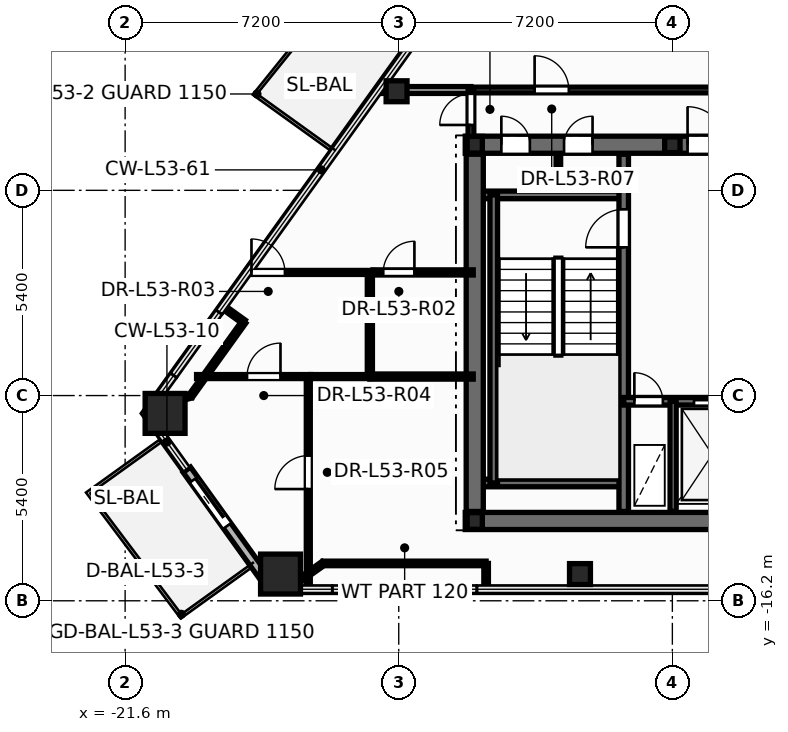
"""IFC4 building model, lengths in metres.
Left out: names, types, materials, properties, quantities, classifications, styles, units other than length and angle.
Written with IfcOpenShell. Run it as: python <this file> out.ifc"""

import sys

from ifc_helpers import new_model, si_unit, direction, frame, frame_2d, origin, origin_2d, place, context, subcontext, project, spatial, rectangle, hollow_rectangle, hollow_circle, i_section, extrude, element, fill, save


model = new_model("IFC4")
c1 = context("Model", 3, precision=1e-05, world=origin(), true_north=direction((0.0, 1.0)))
c2 = subcontext(c1, "Body", "Model", "MODEL_VIEW")
j1 = project(units=[si_unit("LENGTHUNIT", "METRE"), si_unit("PLANEANGLEUNIT", "RADIAN")], contexts=[c1])
p1 = place(None, origin())
s1 = spatial("IfcSite", under=j1, at=p1, CompositionType="ELEMENT")
p2 = place(p1, origin())
s2 = spatial("IfcBuilding", under=s1, at=p2, CompositionType="ELEMENT")
p3 = place(p2, frame((0.0, 0.0, 203.7)))
s3 = spatial("IfcBuildingStorey", under=s2, at=p3, CompositionType="ELEMENT", Elevation=203.7)
for number, where, z_axis, x_axis in (
    (1, (-20.548, -11.27, 0.0), (0.0, 0.0, 1.0), (1.0, 0.0, 0.0)),
    (2, (-17.511, -15.497, 0.0), (0.0, 0.0, 1.0), (1.0, 0.0, 0.0)),
):
    element("IfcColumn", number, at=place(p3, frame(where, z_axis=z_axis, x_axis=x_axis)), inside=s3, PredefinedType="COLUMN", context=c2, shape_type="SweptSolid", body=[
        extrude(hollow_rectangle(XDim=1.05, YDim=1.05, WallThickness=0.045, at=origin_2d()), origin(), (0.0, 0.0, 1.0), 3.6),
    ])
for number, where, z_axis, x_axis in (
    (3, (-9.631, -15.497, 0.0), (0.0, 0.0, 1.0), (1.0, 0.0, 0.0)),
    (4, (-14.457, -2.793, 0.0), (0.0, 0.0, 1.0), (1.0, 0.0, 0.0)),
):
    element("IfcColumn", number, at=place(p3, frame(where, z_axis=z_axis, x_axis=x_axis)), inside=s3, PredefinedType="COLUMN", context=c2, shape_type="SweptSolid", body=[
        extrude(hollow_circle(Radius=0.275, WallThickness=0.024, at=origin_2d()), origin(), (0.0, 0.0, 1.0), 3.6),
    ])
for number, where, z_axis, x_axis in (
    (5, (-12.4, -14.1, 0.0), (0.0, 0.0, 1.0), (1.0, 0.0, 0.0)),
    (6, (-12.4, -4.2, 0.0), (0.0, 0.0, 1.0), (1.0, 0.0, 0.0)),
):
    element("IfcColumn", number, at=place(p3, frame(where, z_axis=z_axis, x_axis=x_axis)), inside=s3, PredefinedType="COLUMN", context=c2, shape_type="SweptSolid", body=[
        extrude(i_section(OverallWidth=0.4, OverallDepth=0.44, WebThickness=0.028, FlangeThickness=0.04, at=origin_2d()), origin(), (0.0, 0.0, 1.0), 3.6),
    ])
p4 = place(p3, frame((-7.2, -4.2, 0.0), z_axis=(0.0, 0.0, 1.0), x_axis=(1.0, 0.0, 0.0)))
e7 = element("IfcColumn", 7, at=p4, inside=s3, PredefinedType="PILASTER", context=c2, shape_type="SweptSolid", body=[
    extrude(i_section(OverallWidth=0.405, OverallDepth=0.414, WebThickness=0.022, FlangeThickness=0.032, at=origin_2d()), origin(), (0.0, 0.0, 1.0), 3.6),
])
p5 = place(p3, frame((-19.976, -12.751, -0.015), z_axis=(0.0, 0.0, 1.0), x_axis=(0.5835494265, -0.812077623649, 0.0)))
e8 = element("IfcWall", 8, at=p5, inside=s3, PredefinedType="STANDARD", context=c2, shape_type="SweptSolid", body=[
    extrude(rectangle(XDim=3.833, YDim=0.24, at=frame_2d((1.917, 0.0))), origin(), (0.0, 0.0, 1.0), 2.802),
])
p6 = place(p5, frame((0.32, 0.0, 0.015)))
e9 = element("IfcOpeningElement", 9, at=p6, cuts=e8, PredefinedType="OPENING", context=c2, shape_type="SweptSolid", body=[
    extrude(rectangle(XDim=1.506, YDim=2.204, at=frame_2d((0.75, 1.102))), frame((0.0, 0.13, 0.0), z_axis=(0.0, -1.0, 0.0), x_axis=(1.0, 0.0, 0.0)), (0.0, 0.0, 1.0), 0.26),
])
p7 = place(p3, frame((-10.2, -5.52, 0.0), z_axis=(0.0, 0.0, 1.0), x_axis=(0.0, 1.0, 0.0)))
e10 = element("IfcWall", 10, at=p7, inside=s3, PredefinedType="PARTITIONING", context=c2, shape_type="SweptSolid", body=[
    extrude(rectangle(XDim=1.12, YDim=0.12, at=frame_2d((0.56, 0.0))), origin(), (0.0, 0.0, 1.0), 3.345),
])
p8 = place(p3, frame((-12.65, -14.1, 0.0), z_axis=(0.0, 0.0, 1.0), x_axis=(1.0, 0.0, 0.0)))
e11 = element("IfcWall", 11, at=p8, inside=s3, PredefinedType="SHEAR", context=c2, shape_type="SweptSolid", body=[
    extrude(rectangle(XDim=25.3, YDim=0.45, at=frame_2d((12.65, 0.0))), origin(), (0.0, 0.0, 1.0), 3.6),
])
p9 = place(p3, frame((-12.65, -4.2, 0.0), z_axis=(0.0, 0.0, 1.0), x_axis=(1.0, 0.0, 0.0)))
e12 = element("IfcWall", 12, at=p9, inside=s3, PredefinedType="SHEAR", context=c2, shape_type="SweptSolid", body=[
    extrude(rectangle(XDim=25.3, YDim=0.45, at=frame_2d((12.65, 0.0))), origin(), (0.0, 0.0, 1.0), 3.6),
])
p10 = place(p9, frame((0.95, 0.0, 0.0)))
e13 = element("IfcOpeningElement", 13, at=p10, cuts=e12, PredefinedType="OPENING", context=c2, shape_type="SweptSolid", body=[
    extrude(rectangle(XDim=0.756, YDim=2.054, at=frame_2d((0.375, 1.027))), frame((0.0, 0.235, 0.0), z_axis=(0.0, -1.0, 0.0), x_axis=(1.0, 0.0, 0.0)), (0.0, 0.0, 1.0), 0.47),
])
p11 = place(p9, frame((2.6, 0.0, 0.0)))
e14 = element("IfcOpeningElement", 14, at=p11, cuts=e12, PredefinedType="OPENING", context=c2, shape_type="SweptSolid", body=[
    extrude(rectangle(XDim=0.756, YDim=2.054, at=frame_2d((0.375, 1.027))), frame((0.0, 0.235, 0.0), z_axis=(0.0, -1.0, 0.0), x_axis=(1.0, 0.0, 0.0)), (0.0, 0.0, 1.0), 0.47),
])
p12 = place(p9, frame((21.85, 0.0, 0.0)))
e15 = element("IfcOpeningElement", 15, at=p12, cuts=e12, PredefinedType="OPENING", context=c2, shape_type="SweptSolid", body=[
    extrude(rectangle(XDim=0.756, YDim=2.054, at=frame_2d((0.375, 1.027))), frame((0.0, 0.235, 0.0), z_axis=(0.0, -1.0, 0.0), x_axis=(1.0, 0.0, 0.0)), (0.0, 0.0, 1.0), 0.47),
])
p13 = place(p9, frame((23.5, 0.0, 0.0)))
e16 = element("IfcOpeningElement", 16, at=p13, cuts=e12, PredefinedType="OPENING", context=c2, shape_type="SweptSolid", body=[
    extrude(rectangle(XDim=0.756, YDim=2.054, at=frame_2d((0.375, 1.027))), frame((0.0, 0.235, 0.0), z_axis=(0.0, -1.0, 0.0), x_axis=(1.0, 0.0, 0.0)), (0.0, 0.0, 1.0), 0.47),
])
p14 = place(p9, frame((5.85, 0.0, 0.0)))
e17 = element("IfcOpeningElement", 17, at=p14, cuts=e12, PredefinedType="OPENING", context=c2, shape_type="SweptSolid", body=[
    extrude(rectangle(XDim=1.006, YDim=2.104, at=frame_2d((0.5, 1.052))), frame((0.0, 0.235, 0.0), z_axis=(0.0, -1.0, 0.0), x_axis=(1.0, 0.0, 0.0)), (0.0, 0.0, 1.0), 0.47),
])
p15 = place(p9, frame((10.35, 0.0, 0.0)))
e18 = element("IfcOpeningElement", 18, at=p15, cuts=e12, PredefinedType="OPENING", context=c2, shape_type="SweptSolid", body=[
    extrude(rectangle(XDim=1.406, YDim=2.154, at=frame_2d((0.7, 1.077))), frame((0.0, 0.235, 0.0), z_axis=(0.0, -1.0, 0.0), x_axis=(1.0, 0.0, 0.0)), (0.0, 0.0, 1.0), 0.47),
])
p16 = place(p9, frame((18.45, 0.0, 0.0)))
e19 = element("IfcOpeningElement", 19, at=p16, cuts=e12, PredefinedType="OPENING", context=c2, shape_type="SweptSolid", body=[
    extrude(rectangle(XDim=1.006, YDim=2.104, at=frame_2d((0.5, 1.052))), frame((0.0, 0.235, 0.0), z_axis=(0.0, -1.0, 0.0), x_axis=(1.0, 0.0, 0.0)), (0.0, 0.0, 1.0), 0.47),
])
for number, where, z_axis, x_axis in (
    (20, (-12.35, -5.52, 0.0), (0.0, 0.0, 1.0), (1.0, 0.0, 0.0)),
    (21, (-12.35, -13.1, 0.0), (0.0, 0.0, 1.0), (1.0, 0.0, 0.0)),
):
    element("IfcWall", number, at=place(p3, frame(where, z_axis=z_axis, x_axis=x_axis)), inside=s3, PredefinedType="SOLIDWALL", context=c2, shape_type="SweptSolid", body=[
        extrude(rectangle(XDim=3.87, YDim=0.2, at=frame_2d((1.935, 0.0))), origin(), (0.0, 0.0, 1.0), 3.6),
    ])
p17 = place(p3, frame((-11.9, -13.1, 0.0), z_axis=(0.0, 0.0, 1.0), x_axis=(0.0, 1.0, 0.0)))
e22 = element("IfcWall", 22, at=p17, inside=s3, PredefinedType="SOLIDWALL", context=c2, shape_type="SweptSolid", body=[
    extrude(rectangle(XDim=7.58, YDim=0.2, at=frame_2d((3.79, 0.0))), origin(), (0.0, 0.0, 1.0), 3.6),
])
p18 = place(p3, frame((-8.48, -13.85, 0.0), z_axis=(0.0, 0.0, 1.0), x_axis=(0.0, 1.0, 0.0)))
e23 = element("IfcWall", 23, at=p18, inside=s3, PredefinedType="SHEAR", context=c2, shape_type="SweptSolid", body=[
    extrude(rectangle(XDim=9.4, YDim=0.25, at=frame_2d((4.7, 0.0))), origin(), (0.0, 0.0, 1.0), 3.6),
])
p19 = place(p18, frame((6.95, 0.0, 0.0)))
e24 = element("IfcOpeningElement", 24, at=p19, cuts=e23, PredefinedType="OPENING", context=c2, shape_type="SweptSolid", body=[
    extrude(rectangle(XDim=1.006, YDim=2.104, at=frame_2d((0.5, 1.052))), frame((0.0, 0.135, 0.0), z_axis=(0.0, -1.0, 0.0), x_axis=(1.0, 0.0, 0.0)), (0.0, 0.0, 1.0), 0.27),
])
p20 = place(p3, frame((-8.48, -10.95, 0.0), z_axis=(0.0, 0.0, 1.0), x_axis=(1.0, 0.0, 0.0)))
e25 = element("IfcWall", 25, at=p20, inside=s3, PredefinedType="SOLIDWALL", context=c2, shape_type="SweptSolid", body=[
    extrude(rectangle(XDim=3.36, YDim=0.2, at=frame_2d((1.68, 0.0))), origin(), (0.0, 0.0, 1.0), 3.6),
])
p21 = place(p20, frame((0.28, 0.0, 0.0)))
e26 = element("IfcOpeningElement", 26, at=p21, cuts=e25, PredefinedType="OPENING", context=c2, shape_type="SweptSolid", body=[
    extrude(rectangle(XDim=0.756, YDim=2.054, at=frame_2d((0.375, 1.027))), frame((0.0, 0.11, 0.0), z_axis=(0.0, -1.0, 0.0), x_axis=(1.0, 0.0, 0.0)), (0.0, 0.0, 1.0), 0.22),
])
p22 = place(p20, frame((1.85, 0.0, 0.0)))
e27 = element("IfcOpeningElement", 27, at=p22, cuts=e25, PredefinedType="OPENING", context=c2, shape_type="SweptSolid", body=[
    extrude(rectangle(XDim=1.106, YDim=2.104, at=frame_2d((0.55, 1.052))), frame((0.0, 0.11, 0.0), z_axis=(0.0, -1.0, 0.0), x_axis=(1.0, 0.0, 0.0)), (0.0, 0.0, 1.0), 0.22),
])
p23 = place(p3, frame((-7.18, -13.85, 0.0), z_axis=(0.0, 0.0, 1.0), x_axis=(0.0, 1.0, 0.0)))
e28 = element("IfcWall", 28, at=p23, inside=s3, PredefinedType="PARTITIONING", context=c2, shape_type="SweptSolid", body=[
    extrude(rectangle(XDim=2.9, YDim=0.16, at=frame_2d((1.45, 0.0))), origin(), (0.0, 0.0, 1.0), 2.47),
])
p24 = place(p3, frame((-12.4, -13.85, 0.0), z_axis=(0.0, 0.0, 1.0), x_axis=(0.0, 1.0, 0.0)))
e29 = element("IfcWall", 29, at=p24, inside=s3, PredefinedType="SHEAR", context=c2, shape_type="SweptSolid", body=[
    extrude(rectangle(XDim=9.4, YDim=0.45, at=frame_2d((4.7, 0.0))), origin(), (0.0, 0.0, 1.0), 3.6),
])
p25 = place(p3, frame((-12.5, -2.76, 0.0), z_axis=(0.0, 0.0, 1.0), x_axis=(1.0, 0.0, 0.0)))
e30 = element("IfcWall", 30, at=p25, inside=s3, PredefinedType="PARTITIONING", context=c2, shape_type="SweptSolid", body=[
    extrude(rectangle(XDim=7.76, YDim=0.15, at=frame_2d((3.88, 0.0))), origin(), (0.0, 0.0, 1.0), 2.32),
])
p26 = place(p25, frame((1.675, 0.0, 0.0)))
e31 = element("IfcOpeningElement", 31, at=p26, cuts=e30, PredefinedType="OPENING", context=c2, shape_type="SweptSolid", body=[
    extrude(rectangle(XDim=0.906, YDim=2.104, at=frame_2d((0.45, 1.052))), frame((0.0, 0.085, 0.0), z_axis=(0.0, -1.0, 0.0), x_axis=(1.0, 0.0, 0.0)), (0.0, 0.0, 1.0), 0.17),
])
p27 = place(p3, frame((-16.78, -15.72, 0.0), z_axis=(0.0, 0.0, 1.0), x_axis=(0.0, 1.0, 0.0)))
e32 = element("IfcWall", 32, at=p27, inside=s3, PredefinedType="PARTITIONING", context=c2, shape_type="SweptSolid", body=[
    extrude(rectangle(XDim=5.42, YDim=0.105, at=frame_2d((2.71, 0.0))), origin(), (0.0, 0.0, 1.0), 2.787),
])
p28 = place(p27, frame((2.46, 0.0, 0.0)))
e33 = element("IfcOpeningElement", 33, at=p28, cuts=e32, PredefinedType="OPENING", context=c2, shape_type="SweptSolid", body=[
    extrude(rectangle(XDim=0.886, YDim=2.104, at=frame_2d((0.44, 1.052))), frame((0.0, 0.062, 0.0), z_axis=(0.0, -1.0, 0.0), x_axis=(1.0, 0.0, 0.0)), (0.0, 0.0, 1.0), 0.125),
])
p29 = place(p3, frame((-16.389, -15.217, 0.0), z_axis=(0.0, 0.0, 1.0), x_axis=(1.0, 0.0, 0.0)))
e34 = element("IfcWall", 34, at=p29, inside=s3, PredefinedType="PARTITIONING", context=c2, shape_type="SweptSolid", body=[
    extrude(rectangle(XDim=4.288, YDim=0.12, at=frame_2d((2.144, 0.0))), origin(), (0.0, 0.0, 1.0), 3.345),
])
p30 = place(p3, frame((-18.375, -7.56, 0.0), z_axis=(0.0, 0.0, 1.0), x_axis=(1.0, 0.0, 0.0)))
e35 = element("IfcWall", 35, at=p30, inside=s3, PredefinedType="PARTITIONING", context=c2, shape_type="SweptSolid", body=[
    extrude(rectangle(XDim=3.295, YDim=0.105, at=frame_2d((1.647, 0.0))), origin(), (0.0, 0.0, 1.0), 2.32),
])
p31 = place(p30, frame((0.1, 0.0, 0.0)))
e36 = element("IfcOpeningElement", 36, at=p31, cuts=e35, PredefinedType="OPENING", context=c2, shape_type="SweptSolid", body=[
    extrude(rectangle(XDim=0.886, YDim=2.104, at=frame_2d((0.44, 1.052))), frame((0.0, 0.062, 0.0), z_axis=(0.0, -1.0, 0.0), x_axis=(1.0, 0.0, 0.0)), (0.0, 0.0, 1.0), 0.125),
])
p32 = place(p3, frame((-19.72, -10.3, 0.0), z_axis=(0.0, 0.0, 1.0), x_axis=(1.0, 0.0, 0.0)))
e37 = element("IfcWall", 37, at=p32, inside=s3, PredefinedType="PARTITIONING", context=c2, shape_type="SweptSolid", body=[
    extrude(rectangle(XDim=3.0, YDim=0.105, at=frame_2d((1.5, 0.0))), origin(), (0.0, 0.0, 1.0), 2.32),
])
p33 = place(p32, frame((1.328, 0.0, 0.0)))
e38 = element("IfcOpeningElement", 38, at=p33, cuts=e37, PredefinedType="OPENING", context=c2, shape_type="SweptSolid", body=[
    extrude(rectangle(XDim=0.886, YDim=2.104, at=frame_2d((0.44, 1.052))), frame((0.0, 0.062, 0.0), z_axis=(0.0, -1.0, 0.0), x_axis=(1.0, 0.0, 0.0)), (0.0, 0.0, 1.0), 0.125),
])
p34 = place(p3, frame((-15.078, -7.56, 0.0), z_axis=(0.0, 0.0, 1.0), x_axis=(1.0, 0.0, 0.0)))
e39 = element("IfcWall", 39, at=p34, inside=s3, PredefinedType="PARTITIONING", context=c2, shape_type="SweptSolid", body=[
    extrude(rectangle(XDim=2.638, YDim=0.135, at=frame_2d((1.319, 0.0))), origin(), (0.0, 0.0, 1.0), 2.787),
])
p35 = place(p34, frame((0.271, 0.0, 0.0)))
e40 = element("IfcOpeningElement", 40, at=p35, cuts=e39, PredefinedType="OPENING", context=c2, shape_type="SweptSolid", body=[
    extrude(rectangle(XDim=0.826, YDim=2.104, at=frame_2d((0.41, 1.052))), frame((0.0, 0.078, 0.0), z_axis=(0.0, -1.0, 0.0), x_axis=(1.0, 0.0, 0.0)), (0.0, 0.0, 1.0), 0.155),
])
p36 = place(p3, frame((-15.16, -10.3, 0.0), z_axis=(0.0, 0.0, 1.0), x_axis=(0.0, 1.0, 0.0)))
e41 = element("IfcWall", 41, at=p36, inside=s3, PredefinedType="PARTITIONING", context=c2, shape_type="SweptSolid", body=[
    extrude(rectangle(XDim=2.74, YDim=0.135, at=frame_2d((1.37, 0.0))), origin(), (0.0, 0.0, 1.0), 3.345),
])
p37 = place(p3, frame((-15.16, -10.3, 0.0), z_axis=(0.0, 0.0, 1.0), x_axis=(1.0, 0.0, 0.0)))
e42 = element("IfcWall", 42, at=p37, inside=s3, PredefinedType="PARTITIONING", context=c2, shape_type="SweptSolid", body=[
    extrude(rectangle(XDim=2.72, YDim=0.135, at=frame_2d((1.36, 0.0))), origin(), (0.0, 0.0, 1.0), 2.787),
])
p38 = place(p3, frame((-14.926, -2.76, 0.0), z_axis=(0.0, 0.0, 1.0), x_axis=(1.0, 0.0, 0.0)))
e43 = element("IfcWall", 43, at=p38, inside=s3, PredefinedType="PARTITIONING", context=c2, shape_type="SweptSolid", body=[
    extrude(rectangle(XDim=2.426, YDim=0.18, at=frame_2d((1.213, 0.0))), origin(), (0.0, 0.0, 1.0), 2.62),
])
p39 = place(p3, frame((-18.473, -8.862, 0.0), z_axis=(0.0, 0.0, 1.0), x_axis=(-0.583631855745, -0.812018384619, 0.0)))
e44 = element("IfcWall", 44, at=p39, inside=s3, PredefinedType="PARTITIONING", context=c2, shape_type="SweptSolid", body=[
    extrude(rectangle(XDim=2.4, YDim=0.12, at=frame_2d((1.2, 0.0))), origin(), (0.0, 0.0, 1.0), 2.32),
])
p40 = place(p3, frame((-16.718, -10.3, 0.0), z_axis=(0.0, 0.0, 1.0), x_axis=(1.0, 0.0, 0.0)))
e45 = element("IfcWall", 45, at=p40, inside=s3, PredefinedType="PARTITIONING", context=c2, shape_type="SweptSolid", body=[
    extrude(rectangle(XDim=1.558, YDim=0.105, at=frame_2d((0.779, 0.0))), origin(), (0.0, 0.0, 1.0), 3.345),
])
p41 = place(p3, frame((-12.5, -4.24, 0.0), z_axis=(0.0, 0.0, 1.0), x_axis=(0.0, 1.0, 0.0)))
e46 = element("IfcWall", 46, at=p41, inside=s3, PredefinedType="PARTITIONING", context=c2, shape_type="SweptSolid", body=[
    extrude(rectangle(XDim=1.48, YDim=0.15, at=frame_2d((0.74, 0.0))), origin(), (0.0, 0.0, 1.0), 2.32),
])
p42 = place(p41, frame((0.56, 0.0, 0.0)))
e47 = element("IfcOpeningElement", 47, at=p42, cuts=e46, PredefinedType="OPENING", context=c2, shape_type="SweptSolid", body=[
    extrude(rectangle(XDim=0.826, YDim=2.104, at=frame_2d((0.41, 1.052))), frame((0.0, 0.085, 0.0), z_axis=(0.0, -1.0, 0.0), x_axis=(1.0, 0.0, 0.0)), (0.0, 0.0, 1.0), 0.17),
])
p43 = place(p3, frame((-17.085, -15.712, 0.0), z_axis=(0.0, 0.0, 1.0), x_axis=(0.814775258606, 0.579776920861, 0.0)))
e48 = element("IfcWall", 48, at=p43, inside=s3, PredefinedType="PARTITIONING", context=c2, shape_type="SweptSolid", body=[
    extrude(rectangle(XDim=0.854, YDim=0.12, at=frame_2d((0.427, 0.0))), origin(), (0.0, 0.0, 1.0), 2.787),
])
p44 = place(p3, frame((-19.874, -10.811, 0.0), z_axis=(0.0, 0.0, 1.0), x_axis=(-0.967403978064, -0.253238115667, 0.0)))
e49 = element("IfcWall", 49, at=p44, inside=s3, PredefinedType="PARTITIONING", context=c2, shape_type="SweptSolid", body=[
    extrude(rectangle(XDim=0.852, YDim=0.12, at=frame_2d((0.426, 0.0))), origin(), (0.0, 0.0, 1.0), 2.32),
])
p45 = place(p3, frame((-19.018, -8.471, 0.0), z_axis=(0.0, 0.0, 1.0), x_axis=(0.812031557065, -0.583613528227, 0.0)))
e50 = element("IfcWall", 50, at=p45, inside=s3, PredefinedType="PARTITIONING", context=c2, shape_type="SweptSolid", body=[
    extrude(rectangle(XDim=0.67, YDim=0.12, at=frame_2d((0.335, 0.0))), origin(), (0.0, 0.0, 1.0), 2.787),
])
p46 = place(p3, frame((-12.101, -15.217, 0.0), z_axis=(0.0, 0.0, 1.0), x_axis=(0.0, -1.0, 0.0)))
e51 = element("IfcWall", 51, at=p46, inside=s3, PredefinedType="PARTITIONING", context=c2, shape_type="SweptSolid", body=[
    extrude(rectangle(XDim=0.67, YDim=0.12, at=frame_2d((0.335, 0.0))), origin(), (0.0, 0.0, 1.0), 2.787),
])
p47 = place(p6, origin())
e52 = element("IfcDoor", 52, at=p47, inside=s3, OperationType="SLIDING_TO_RIGHT", PredefinedType="DOOR", context=c2, shape_type="SweptSolid", body=[
    extrude(rectangle(XDim=1.5, YDim=2.2, at=frame_2d((0.75, 1.1))), frame((0.0, 0.025, 0.0), z_axis=(0.0, -1.0, 0.0), x_axis=(1.0, 0.0, 0.0)), (0.0, 0.0, 1.0), 0.05),
])
fill(e9, e52)
p48 = place(p19, origin())
e53 = element("IfcDoor", 53, at=p48, inside=s3, OperationType="SINGLE_SWING_LEFT", PredefinedType="DOOR", context=c2, shape_type="SweptSolid", body=[
    extrude(rectangle(XDim=1.0, YDim=2.1, at=frame_2d((0.5, 1.05))), frame((0.0, 0.025, 0.0), z_axis=(0.0, -1.0, 0.0), x_axis=(1.0, 0.0, 0.0)), (0.0, 0.0, 1.0), 0.05),
])
fill(e24, e53)
p49 = place(p21, origin())
e54 = element("IfcDoor", 54, at=p49, inside=s3, OperationType="SINGLE_SWING_LEFT", PredefinedType="DOOR", context=c2, shape_type="SweptSolid", body=[
    extrude(rectangle(XDim=0.75, YDim=2.05, at=frame_2d((0.375, 1.025))), frame((0.0, 0.025, 0.0), z_axis=(0.0, -1.0, 0.0), x_axis=(1.0, 0.0, 0.0)), (0.0, 0.0, 1.0), 0.05),
])
fill(e26, e54)
p50 = place(p22, origin())
e55 = element("IfcDoor", 55, at=p50, inside=s3, OperationType="DOUBLE_DOOR_SLIDING", PredefinedType="DOOR", context=c2, shape_type="SweptSolid", body=[
    extrude(rectangle(XDim=1.1, YDim=2.1, at=frame_2d((0.55, 1.05))), frame((0.0, 0.025, 0.0), z_axis=(0.0, -1.0, 0.0), x_axis=(1.0, 0.0, 0.0)), (0.0, 0.0, 1.0), 0.05),
])
fill(e27, e55)
p51 = place(p10, origin())
e56 = element("IfcDoor", 56, at=p51, inside=s3, OperationType="SINGLE_SWING_LEFT", PredefinedType="DOOR", context=c2, shape_type="SweptSolid", body=[
    extrude(rectangle(XDim=0.75, YDim=2.05, at=frame_2d((0.375, 1.025))), frame((0.0, 0.025, 0.0), z_axis=(0.0, -1.0, 0.0), x_axis=(1.0, 0.0, 0.0)), (0.0, 0.0, 1.0), 0.05),
])
fill(e13, e56)
p52 = place(p11, origin())
e57 = element("IfcDoor", 57, at=p52, inside=s3, OperationType="SINGLE_SWING_RIGHT", PredefinedType="DOOR", context=c2, shape_type="SweptSolid", body=[
    extrude(rectangle(XDim=0.75, YDim=2.05, at=frame_2d((0.375, 1.025))), frame((0.0, 0.025, 0.0), z_axis=(0.0, -1.0, 0.0), x_axis=(1.0, 0.0, 0.0)), (0.0, 0.0, 1.0), 0.05),
])
fill(e14, e57)
p53 = place(p14, origin())
e58 = element("IfcDoor", 58, at=p53, inside=s3, OperationType="SINGLE_SWING_LEFT", PredefinedType="DOOR", context=c2, shape_type="SweptSolid", body=[
    extrude(rectangle(XDim=1.0, YDim=2.1, at=frame_2d((0.5, 1.05))), frame((0.0, 0.025, 0.0), z_axis=(0.0, -1.0, 0.0), x_axis=(1.0, 0.0, 0.0)), (0.0, 0.0, 1.0), 0.05),
])
fill(e17, e58)
p54 = place(p42, origin())
e59 = element("IfcDoor", 59, at=p54, inside=s3, OperationType="SINGLE_SWING_LEFT", PredefinedType="DOOR", context=c2, shape_type="SweptSolid", body=[
    extrude(rectangle(XDim=0.82, YDim=2.1, at=frame_2d((0.41, 1.05))), frame((0.0, 0.025, 0.0), z_axis=(0.0, -1.0, 0.0), x_axis=(1.0, 0.0, 0.0)), (0.0, 0.0, 1.0), 0.05),
])
fill(e47, e59)
p55 = place(p35, origin())
e60 = element("IfcDoor", 60, at=p55, inside=s3, OperationType="SINGLE_SWING_RIGHT", PredefinedType="DOOR", context=c2, shape_type="SweptSolid", body=[
    extrude(rectangle(XDim=0.82, YDim=2.1, at=frame_2d((0.41, 1.05))), frame((0.0, 0.025, 0.0), z_axis=(0.0, -1.0, 0.0), x_axis=(1.0, 0.0, 0.0)), (0.0, 0.0, 1.0), 0.05),
])
fill(e40, e60)
p56 = place(p31, origin())
e61 = element("IfcDoor", 61, at=p56, inside=s3, OperationType="SINGLE_SWING_LEFT", PredefinedType="DOOR", context=c2, shape_type="SweptSolid", body=[
    extrude(rectangle(XDim=0.88, YDim=2.1, at=frame_2d((0.44, 1.05))), frame((0.0, 0.025, 0.0), z_axis=(0.0, -1.0, 0.0), x_axis=(1.0, 0.0, 0.0)), (0.0, 0.0, 1.0), 0.05),
])
fill(e36, e61)
p57 = place(p33, origin())
e62 = element("IfcDoor", 62, at=p57, inside=s3, OperationType="SINGLE_SWING_RIGHT", PredefinedType="DOOR", context=c2, shape_type="SweptSolid", body=[
    extrude(rectangle(XDim=0.88, YDim=2.1, at=frame_2d((0.44, 1.05))), frame((0.0, 0.025, 0.0), z_axis=(0.0, -1.0, 0.0), x_axis=(1.0, 0.0, 0.0)), (0.0, 0.0, 1.0), 0.05),
])
fill(e38, e62)
p58 = place(p28, origin())
e63 = element("IfcDoor", 63, at=p58, inside=s3, OperationType="SINGLE_SWING_LEFT", PredefinedType="DOOR", context=c2, shape_type="SweptSolid", body=[
    extrude(rectangle(XDim=0.88, YDim=2.1, at=frame_2d((0.44, 1.05))), frame((0.0, 0.025, 0.0), z_axis=(0.0, -1.0, 0.0), x_axis=(1.0, 0.0, 0.0)), (0.0, 0.0, 1.0), 0.05),
])
fill(e33, e63)
p59 = place(p26, origin())
e64 = element("IfcDoor", 64, at=p59, inside=s3, OperationType="SINGLE_SWING_LEFT", PredefinedType="DOOR", context=c2, shape_type="SweptSolid", body=[
    extrude(rectangle(XDim=0.9, YDim=2.1, at=frame_2d((0.45, 1.05))), frame((0.0, 0.025, 0.0), z_axis=(0.0, -1.0, 0.0), x_axis=(1.0, 0.0, 0.0)), (0.0, 0.0, 1.0), 0.05),
])
fill(e31, e64)
save(model, sys.argv[1])
